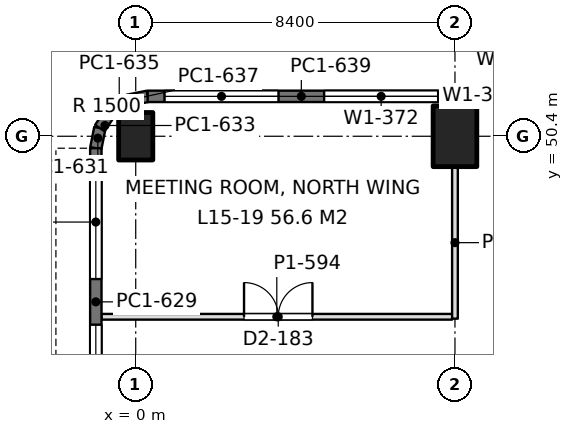
"""IFC4 building model, lengths in metres.
Left out: names, types, materials, properties, quantities, classifications, styles, units other than length and angle.
Written with IfcOpenShell. Run it as: python <this file> out.ifc"""

import sys

from ifc_helpers import new_model, si_unit, direction, frame, frame_2d, origin, origin_2d, place, context, subcontext, project, spatial, rectangle, extrude, element, fill, save


model = new_model("IFC4")
c1 = context("Model", 3, precision=1e-05, world=origin(), true_north=direction((0.0, 1.0)))
c2 = subcontext(c1, "Body", "Model", "MODEL_VIEW")
j1 = project(units=[si_unit("LENGTHUNIT", "METRE"), si_unit("PLANEANGLEUNIT", "RADIAN")], contexts=[c1])
p1 = place(None, origin())
s1 = spatial("IfcSite", under=j1, at=p1, CompositionType="ELEMENT")
p2 = place(p1, origin())
s2 = spatial("IfcBuilding", under=s1, at=p2, CompositionType="ELEMENT")
p3 = place(p2, frame((0.0, 0.0, 68.4)))
s3 = spatial("IfcBuildingStorey", under=s2, at=p3, CompositionType="ELEMENT", Elevation=68.4)
p4 = place(p3, frame((0.0, 50.4, 0.0), z_axis=(0.0, 0.0, 1.0), x_axis=(1.0, 0.0, 0.0)))
e1 = element("IfcColumn", 1, at=p4, inside=s3, PredefinedType="COLUMN", context=c2, shape_type="SweptSolid", body=[
    extrude(rectangle(XDim=0.9, YDim=1.25, at=origin_2d()), origin(), (0.0, 0.0, 1.0), 4.5),
])
p5 = place(p3, frame((8.4, 50.4, 0.0), z_axis=(0.0, 0.0, 1.0), x_axis=(1.0, 0.0, 0.0)))
e2 = element("IfcColumn", 2, at=p5, inside=s3, PredefinedType="COLUMN", context=c2, shape_type="SweptSolid", body=[
    extrude(rectangle(XDim=1.15, YDim=1.6, at=origin_2d()), origin(), (0.0, 0.0, 1.0), 4.5),
])
p6 = place(p3, frame((-1.05, 42.0, 0.0), z_axis=(0.0, 0.0, 1.0), x_axis=(0.0, 1.0, 0.0)))
e3 = element("IfcWall", 3, at=p6, inside=s3, PredefinedType="SOLIDWALL", context=c2, shape_type="SweptSolid", body=[
    extrude(rectangle(XDim=8.085, YDim=0.3, at=frame_2d((4.042, 0.0))), origin(), (0.0, 0.0, 1.0), 4.34),
])
p7 = place(p6, frame((0.443, 0.0, 0.9)))
e4 = element("IfcOpeningElement", 4, at=p7, cuts=e3, PredefinedType="OPENING", context=c2, shape_type="SweptSolid", body=[
    extrude(rectangle(XDim=3.0, YDim=1.9, at=frame_2d((1.5, 0.95))), frame((0.0, 0.16, 0.0), z_axis=(0.0, -1.0, 0.0), x_axis=(1.0, 0.0, 0.0)), (0.0, 0.0, 1.0), 0.32),
])
p8 = place(p6, frame((4.643, 0.0, 0.9)))
e5 = element("IfcOpeningElement", 5, at=p8, cuts=e3, PredefinedType="OPENING", context=c2, shape_type="SweptSolid", body=[
    extrude(rectangle(XDim=3.0, YDim=1.9, at=frame_2d((1.5, 0.95))), frame((0.0, 0.16, 0.0), z_axis=(0.0, -1.0, 0.0), x_axis=(1.0, 0.0, 0.0)), (0.0, 0.0, 1.0), 0.32),
])
p9 = place(p3, frame((-1.05, 50.085, 0.0), z_axis=(0.0, 0.0, 1.0), x_axis=(0.195073962632, 0.980788534345, 0.0)))
e6 = element("IfcWall", 6, at=p9, inside=s3, PredefinedType="SOLIDWALL", context=c2, shape_type="SweptSolid", body=[
    extrude(rectangle(XDim=0.541, YDim=0.3, at=frame_2d((0.271, 0.0))), origin(), (0.0, 0.0, 1.0), 4.34),
])
for number, where, z_axis, x_axis in (
    (7, (-0.945, 50.615, 0.0), (0.0, 0.0, 1.0), (0.556, 0.831, 0.0)),
    (8, (-0.653, 51.052, 0.0), (0.0, 0.0, 1.0), (0.831, 0.556, 0.0)),
):
    element("IfcWall", number, at=place(p3, frame(where, z_axis=z_axis, x_axis=x_axis)), inside=s3, PredefinedType="SOLIDWALL", context=c2, shape_type="SweptSolid", body=[
        extrude(rectangle(XDim=0.526, YDim=0.3, at=frame_2d((0.263, 0.0))), origin(), (0.0, 0.0, 1.0), 4.34),
    ])
p10 = place(p3, frame((-0.216, 51.344, 0.0), z_axis=(0.0, 0.0, 1.0), x_axis=(0.980788534345, 0.195073962632, 0.0)))
e9 = element("IfcWall", 9, at=p10, inside=s3, PredefinedType="SOLIDWALL", context=c2, shape_type="SweptSolid", body=[
    extrude(rectangle(XDim=0.541, YDim=0.3, at=frame_2d((0.271, 0.0))), origin(), (0.0, 0.0, 1.0), 4.34),
])
p11 = place(p3, frame((0.315, 51.45, 0.0), z_axis=(0.0, 0.0, 1.0), x_axis=(1.0, 0.0, 0.0)))
e10 = element("IfcWall", 10, at=p11, inside=s3, PredefinedType="SOLIDWALL", context=c2, shape_type="SweptSolid", body=[
    extrude(rectangle(XDim=8.085, YDim=0.3, at=frame_2d((4.042, 0.0))), origin(), (0.0, 0.0, 1.0), 4.34),
])
p12 = place(p11, frame((0.443, 0.0, 0.9)))
e11 = element("IfcOpeningElement", 11, at=p12, cuts=e10, PredefinedType="OPENING", context=c2, shape_type="SweptSolid", body=[
    extrude(rectangle(XDim=3.0, YDim=1.9, at=frame_2d((1.5, 0.95))), frame((0.0, 0.16, 0.0), z_axis=(0.0, -1.0, 0.0), x_axis=(1.0, 0.0, 0.0)), (0.0, 0.0, 1.0), 0.32),
])
p13 = place(p11, frame((4.643, 0.0, 0.9)))
e12 = element("IfcOpeningElement", 12, at=p13, cuts=e10, PredefinedType="OPENING", context=c2, shape_type="SweptSolid", body=[
    extrude(rectangle(XDim=3.0, YDim=1.9, at=frame_2d((1.5, 0.95))), frame((0.0, 0.16, 0.0), z_axis=(0.0, -1.0, 0.0), x_axis=(1.0, 0.0, 0.0)), (0.0, 0.0, 1.0), 0.32),
])
p14 = place(p3, frame((8.4, 51.45, 0.0), z_axis=(0.0, 0.0, 1.0), x_axis=(1.0, 0.0, 0.0)))
e13 = element("IfcWall", 13, at=p14, inside=s3, PredefinedType="SOLIDWALL", context=c2, shape_type="SweptSolid", body=[
    extrude(rectangle(XDim=8.4, YDim=0.3, at=frame_2d((4.2, 0.0))), origin(), (0.0, 0.0, 1.0), 4.34),
])
p15 = place(p14, frame((0.6, 0.0, 0.9)))
e14 = element("IfcOpeningElement", 14, at=p15, cuts=e13, PredefinedType="OPENING", context=c2, shape_type="SweptSolid", body=[
    extrude(rectangle(XDim=3.0, YDim=1.9, at=frame_2d((1.5, 0.95))), frame((0.0, 0.16, 0.0), z_axis=(0.0, -1.0, 0.0), x_axis=(1.0, 0.0, 0.0)), (0.0, 0.0, 1.0), 0.32),
])
p16 = place(p14, frame((4.8, 0.0, 0.9)))
e15 = element("IfcOpeningElement", 15, at=p16, cuts=e13, PredefinedType="OPENING", context=c2, shape_type="SweptSolid", body=[
    extrude(rectangle(XDim=3.0, YDim=1.9, at=frame_2d((1.5, 0.95))), frame((0.0, 0.16, 0.0), z_axis=(0.0, -1.0, 0.0), x_axis=(1.0, 0.0, 0.0)), (0.0, 0.0, 1.0), 0.32),
])
p17 = place(p3, frame((-0.902, 45.65, 0.0), z_axis=(0.0, 0.0, 1.0), x_axis=(1.0, 0.0, 0.0)))
e16 = element("IfcWall", 16, at=p17, inside=s3, PredefinedType="PARTITIONING", context=c2, shape_type="SweptSolid", body=[
    extrude(rectangle(XDim=9.228, YDim=0.15, at=frame_2d((4.614, 0.0))), origin(), (0.0, 0.0, 1.0), 3.74),
])
p18 = place(p17, frame((3.752, 0.0, 0.0)))
e17 = element("IfcOpeningElement", 17, at=p18, cuts=e16, PredefinedType="OPENING", context=c2, shape_type="SweptSolid", body=[
    extrude(rectangle(XDim=1.8, YDim=2.2, at=frame_2d((0.9, 1.1))), frame((0.0, 0.085, 0.0), z_axis=(0.0, -1.0, 0.0), x_axis=(1.0, 0.0, 0.0)), (0.0, 0.0, 1.0), 0.17),
])
p19 = place(p3, frame((8.4, 45.6, 0.0), z_axis=(0.0, 0.0, 1.0), x_axis=(0.0, 1.0, 0.0)))
e18 = element("IfcWall", 18, at=p19, inside=s3, PredefinedType="PARTITIONING", context=c2, shape_type="SweptSolid", body=[
    extrude(rectangle(XDim=4.001, YDim=0.15, at=frame_2d((2.0, 0.0))), origin(), (0.0, 0.0, 1.0), 3.74),
])
p20 = place(p7, origin())
e19 = element("IfcWindow", 19, at=p20, inside=s3, PartitioningType="SINGLE_PANEL", PredefinedType="WINDOW", context=c2, shape_type="SweptSolid", body=[
    extrude(rectangle(XDim=3.0, YDim=1.9, at=frame_2d((1.5, 0.95))), frame((0.0, 0.03, 0.0), z_axis=(0.0, -1.0, 0.0), x_axis=(1.0, 0.0, 0.0)), (0.0, 0.0, 1.0), 0.06),
])
fill(e4, e19)
p21 = place(p8, origin())
e20 = element("IfcWindow", 20, at=p21, inside=s3, PartitioningType="SINGLE_PANEL", PredefinedType="WINDOW", context=c2, shape_type="SweptSolid", body=[
    extrude(rectangle(XDim=3.0, YDim=1.9, at=frame_2d((1.5, 0.95))), frame((0.0, 0.03, 0.0), z_axis=(0.0, -1.0, 0.0), x_axis=(1.0, 0.0, 0.0)), (0.0, 0.0, 1.0), 0.06),
])
fill(e5, e20)
p22 = place(p12, origin())
e21 = element("IfcWindow", 21, at=p22, inside=s3, PartitioningType="SINGLE_PANEL", PredefinedType="WINDOW", context=c2, shape_type="SweptSolid", body=[
    extrude(rectangle(XDim=3.0, YDim=1.9, at=frame_2d((1.5, 0.95))), frame((0.0, 0.03, 0.0), z_axis=(0.0, -1.0, 0.0), x_axis=(1.0, 0.0, 0.0)), (0.0, 0.0, 1.0), 0.06),
])
fill(e11, e21)
p23 = place(p13, origin())
e22 = element("IfcWindow", 22, at=p23, inside=s3, PartitioningType="SINGLE_PANEL", PredefinedType="WINDOW", context=c2, shape_type="SweptSolid", body=[
    extrude(rectangle(XDim=3.0, YDim=1.9, at=frame_2d((1.5, 0.95))), frame((0.0, 0.03, 0.0), z_axis=(0.0, -1.0, 0.0), x_axis=(1.0, 0.0, 0.0)), (0.0, 0.0, 1.0), 0.06),
])
fill(e12, e22)
p24 = place(p15, origin())
e23 = element("IfcWindow", 23, at=p24, inside=s3, PartitioningType="SINGLE_PANEL", PredefinedType="WINDOW", context=c2, shape_type="SweptSolid", body=[
    extrude(rectangle(XDim=3.0, YDim=1.9, at=frame_2d((1.5, 0.95))), frame((0.0, 0.03, 0.0), z_axis=(0.0, -1.0, 0.0), x_axis=(1.0, 0.0, 0.0)), (0.0, 0.0, 1.0), 0.06),
])
fill(e14, e23)
p25 = place(p18, origin())
e24 = element("IfcDoor", 24, at=p25, inside=s3, OperationType="DOUBLE_DOOR_SINGLE_SWING", PredefinedType="DOOR", context=c2, shape_type="SweptSolid", body=[
    extrude(rectangle(XDim=1.8, YDim=2.2, at=frame_2d((0.9, 1.1))), frame((0.0, 0.025, 0.0), z_axis=(0.0, -1.0, 0.0), x_axis=(1.0, 0.0, 0.0)), (0.0, 0.0, 1.0), 0.05),
])
fill(e17, e24)
save(model, sys.argv[1])
